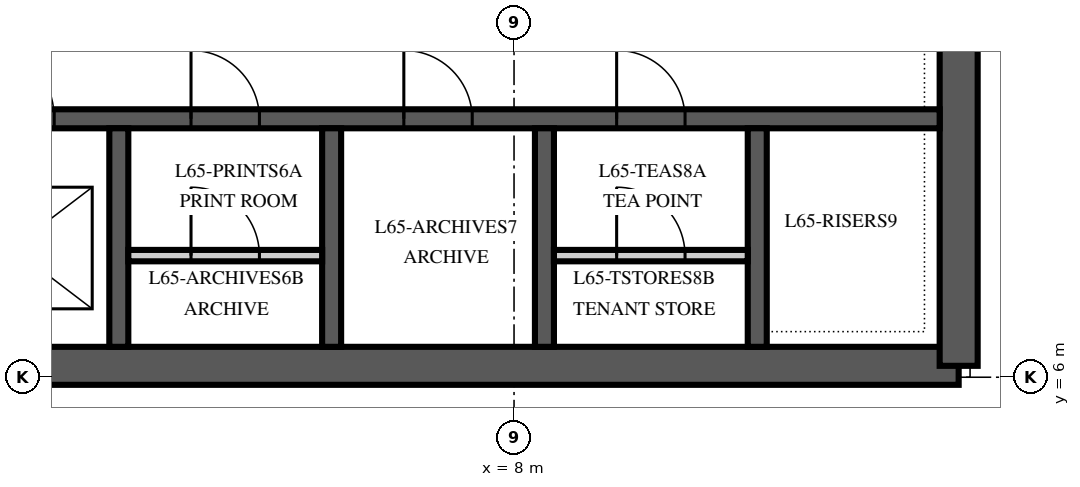
"""IFC4 building model, lengths in metres.
Left out: names, types, materials, properties, quantities, classifications, styles, units other than length and angle.
Written with IfcOpenShell. Run it as: python <this file> out.ifc"""

import sys

from ifc_helpers import new_model, si_unit, direction, frame, frame_2d, origin, place, context, subcontext, project, spatial, polyline, rectangle, outline, extrude, element, fill, save


model = new_model("IFC4")
c1 = context("Model", 3, precision=1e-05, world=origin(), true_north=direction((0.0, 1.0)))
c2 = subcontext(c1, "Body", "Model", "MODEL_VIEW")
j1 = project(units=[si_unit("LENGTHUNIT", "METRE"), si_unit("PLANEANGLEUNIT", "RADIAN")], contexts=[c1])
p1 = place(None, origin())
s1 = spatial("IfcSite", under=j1, at=p1, CompositionType="ELEMENT")
p2 = place(p1, origin())
s2 = spatial("IfcBuilding", under=s1, at=p2, CompositionType="ELEMENT")
p3 = place(p2, frame((0.0, 0.0, 280.0)))
s3 = spatial("IfcBuildingStorey", under=s2, at=p3, CompositionType="ELEMENT", Elevation=280.0)
p4 = place(p3, frame((-13.85, 6.15, 0.0), z_axis=(0.0, 0.0, 1.0), x_axis=(1.0, 0.0, 0.0)))
e1 = element("IfcWall", 1, at=p4, inside=s3, PredefinedType="SHEAR", context=c2, shape_type="SweptSolid", body=[
    extrude(rectangle(XDim=27.7, YDim=0.5, at=frame_2d((13.85, 0.0))), origin(), (0.0, 0.0, 1.0), 4.0),
])
p5 = place(p3, frame((13.85, 6.15, 0.0), z_axis=(0.0, 0.0, 1.0), x_axis=(0.0, 1.0, 0.0)))
e2 = element("IfcWall", 2, at=p5, inside=s3, PredefinedType="SHEAR", context=c2, shape_type="SweptSolid", body=[
    extrude(outline(polyline([(0.0, -0.25), (17.7, -0.25), (17.7, 0.0), (17.45, 0.0), (17.45, 0.25), (0.25, 0.25), (0.25, 0.0), (0.0, 0.0), (0.0, -0.25)])), origin(), (0.0, 0.0, 1.0), 4.0),
])
p6 = place(p5, frame((4.15, 0.0, 0.0)))
e3 = element("IfcOpeningElement", 3, at=p6, cuts=e2, PredefinedType="OPENING", context=c2, shape_type="SweptSolid", body=[
    extrude(rectangle(XDim=1.8, YDim=2.4, at=frame_2d((0.9, 1.2))), frame((0.0, 0.265, 0.0), z_axis=(0.0, -1.0, 0.0), x_axis=(1.0, 0.0, 0.0)), (0.0, 0.0, 1.0), 0.53),
])
p7 = place(p3, frame((-13.6, 9.4, 0.0), z_axis=(0.0, 0.0, 1.0), x_axis=(1.0, 0.0, 0.0)))
e4 = element("IfcWall", 4, at=p7, inside=s3, PredefinedType="SHEAR", context=c2, shape_type="SweptSolid", body=[
    extrude(rectangle(XDim=27.2, YDim=0.25, at=frame_2d((13.6, 0.0))), origin(), (0.0, 0.0, 1.0), 4.0),
])
p8 = place(p7, frame((8.85, 0.0, 0.0)))
e5 = element("IfcOpeningElement", 5, at=p8, cuts=e4, PredefinedType="OPENING", context=c2, shape_type="SweptSolid", body=[
    extrude(rectangle(XDim=1.1, YDim=2.1, at=frame_2d((0.55, 1.05))), frame((0.0, 0.14, 0.0), z_axis=(0.0, -1.0, 0.0), x_axis=(1.0, 0.0, 0.0)), (0.0, 0.0, 1.0), 0.28),
])
p9 = place(p7, frame((11.65, 0.0, 0.0)))
e6 = element("IfcOpeningElement", 6, at=p9, cuts=e4, PredefinedType="OPENING", context=c2, shape_type="SweptSolid", body=[
    extrude(rectangle(XDim=1.1, YDim=2.1, at=frame_2d((0.55, 1.05))), frame((0.0, 0.14, 0.0), z_axis=(0.0, -1.0, 0.0), x_axis=(1.0, 0.0, 0.0)), (0.0, 0.0, 1.0), 0.28),
])
p10 = place(p7, frame((14.45, 0.0, 0.0)))
e7 = element("IfcOpeningElement", 7, at=p10, cuts=e4, PredefinedType="OPENING", context=c2, shape_type="SweptSolid", body=[
    extrude(rectangle(XDim=1.1, YDim=2.1, at=frame_2d((0.55, 1.05))), frame((0.0, 0.14, 0.0), z_axis=(0.0, -1.0, 0.0), x_axis=(1.0, 0.0, 0.0)), (0.0, 0.0, 1.0), 0.28),
])
p11 = place(p7, frame((0.55, 0.0, 0.0)))
e8 = element("IfcOpeningElement", 8, at=p11, cuts=e4, PredefinedType="OPENING", context=c2, shape_type="SweptSolid", body=[
    extrude(rectangle(XDim=0.9, YDim=2.1, at=frame_2d((0.45, 1.05))), frame((0.0, 0.14, 0.0), z_axis=(0.0, -1.0, 0.0), x_axis=(1.0, 0.0, 0.0)), (0.0, 0.0, 1.0), 0.28),
])
p12 = place(p7, frame((3.35, 0.0, 0.0)))
e9 = element("IfcOpeningElement", 9, at=p12, cuts=e4, PredefinedType="OPENING", context=c2, shape_type="SweptSolid", body=[
    extrude(rectangle(XDim=0.9, YDim=2.1, at=frame_2d((0.45, 1.05))), frame((0.0, 0.14, 0.0), z_axis=(0.0, -1.0, 0.0), x_axis=(1.0, 0.0, 0.0)), (0.0, 0.0, 1.0), 0.28),
])
p13 = place(p7, frame((6.15, 0.0, 0.0)))
e10 = element("IfcOpeningElement", 10, at=p13, cuts=e4, PredefinedType="OPENING", context=c2, shape_type="SweptSolid", body=[
    extrude(rectangle(XDim=0.9, YDim=2.1, at=frame_2d((0.45, 1.05))), frame((0.0, 0.14, 0.0), z_axis=(0.0, -1.0, 0.0), x_axis=(1.0, 0.0, 0.0)), (0.0, 0.0, 1.0), 0.28),
])
p14 = place(p7, frame((17.35, 0.0, 0.0)))
e11 = element("IfcOpeningElement", 11, at=p14, cuts=e4, PredefinedType="OPENING", context=c2, shape_type="SweptSolid", body=[
    extrude(rectangle(XDim=0.9, YDim=2.1, at=frame_2d((0.45, 1.05))), frame((0.0, 0.14, 0.0), z_axis=(0.0, -1.0, 0.0), x_axis=(1.0, 0.0, 0.0)), (0.0, 0.0, 1.0), 0.28),
])
p15 = place(p7, frame((20.15, 0.0, 0.0)))
e12 = element("IfcOpeningElement", 12, at=p15, cuts=e4, PredefinedType="OPENING", context=c2, shape_type="SweptSolid", body=[
    extrude(rectangle(XDim=0.9, YDim=2.1, at=frame_2d((0.45, 1.05))), frame((0.0, 0.14, 0.0), z_axis=(0.0, -1.0, 0.0), x_axis=(1.0, 0.0, 0.0)), (0.0, 0.0, 1.0), 0.28),
])
p16 = place(p7, frame((22.95, 0.0, 0.0)))
e13 = element("IfcOpeningElement", 13, at=p16, cuts=e4, PredefinedType="OPENING", context=c2, shape_type="SweptSolid", body=[
    extrude(rectangle(XDim=0.9, YDim=2.1, at=frame_2d((0.45, 1.05))), frame((0.0, 0.14, 0.0), z_axis=(0.0, -1.0, 0.0), x_axis=(1.0, 0.0, 0.0)), (0.0, 0.0, 1.0), 0.28),
])
for number, where, z_axis, x_axis in (
    (14, (2.8, 6.4, 0.0), (0.0, 0.0, 1.0), (0.0, 1.0, 0.0)),
    (15, (5.6, 6.4, 0.0), (0.0, 0.0, 1.0), (0.0, 1.0, 0.0)),
    (16, (8.4, 6.4, 0.0), (0.0, 0.0, 1.0), (0.0, 1.0, 0.0)),
    (17, (11.2, 6.4, 0.0), (0.0, 0.0, 1.0), (0.0, 1.0, 0.0)),
):
    element("IfcWall", number, at=place(p3, frame(where, z_axis=z_axis, x_axis=x_axis)), inside=s3, PredefinedType="SHEAR", context=c2, shape_type="SweptSolid", body=[
        extrude(rectangle(XDim=2.875, YDim=0.25, at=frame_2d((1.438, 0.0))), origin(), (0.0, 0.0, 1.0), 4.0),
    ])
p17 = place(p3, frame((2.925, 7.6, 0.0), z_axis=(0.0, 0.0, 1.0), x_axis=(1.0, 0.0, 0.0)))
e18 = element("IfcWall", 18, at=p17, inside=s3, PredefinedType="PARTITIONING", context=c2, shape_type="SweptSolid", body=[
    extrude(rectangle(XDim=2.55, YDim=0.15, at=frame_2d((1.275, 0.0))), origin(), (0.0, 0.0, 1.0), 3.85),
])
p18 = place(p17, frame((0.825, 0.0, 0.0)))
e19 = element("IfcOpeningElement", 19, at=p18, cuts=e18, PredefinedType="OPENING", context=c2, shape_type="SweptSolid", body=[
    extrude(rectangle(XDim=0.9, YDim=2.1, at=frame_2d((0.45, 1.05))), frame((0.0, 0.09, 0.0), z_axis=(0.0, -1.0, 0.0), x_axis=(1.0, 0.0, 0.0)), (0.0, 0.0, 1.0), 0.18),
])
p19 = place(p3, frame((8.525, 7.6, 0.0), z_axis=(0.0, 0.0, 1.0), x_axis=(1.0, 0.0, 0.0)))
e20 = element("IfcWall", 20, at=p19, inside=s3, PredefinedType="PARTITIONING", context=c2, shape_type="SweptSolid", body=[
    extrude(rectangle(XDim=2.55, YDim=0.15, at=frame_2d((1.275, 0.0))), origin(), (0.0, 0.0, 1.0), 3.85),
])
p20 = place(p19, frame((0.825, 0.0, 0.0)))
e21 = element("IfcOpeningElement", 21, at=p20, cuts=e20, PredefinedType="OPENING", context=c2, shape_type="SweptSolid", body=[
    extrude(rectangle(XDim=0.9, YDim=2.1, at=frame_2d((0.45, 1.05))), frame((0.0, 0.09, 0.0), z_axis=(0.0, -1.0, 0.0), x_axis=(1.0, 0.0, 0.0)), (0.0, 0.0, 1.0), 0.18),
])
p21 = place(p10, origin())
e22 = element("IfcDoor", 22, at=p21, inside=s3, OperationType="SLIDING_TO_LEFT", PredefinedType="DOOR", context=c2, shape_type="SweptSolid", body=[
    extrude(rectangle(XDim=1.1, YDim=2.1, at=frame_2d((0.55, 1.05))), frame((0.0, 0.125, 0.0), z_axis=(0.0, -1.0, 0.0), x_axis=(1.0, 0.0, 0.0)), (0.0, 0.0, 1.0), 0.25),
])
fill(e7, e22)
p22 = place(p14, origin())
e23 = element("IfcDoor", 23, at=p22, inside=s3, OperationType="SINGLE_SWING_LEFT", PredefinedType="DOOR", context=c2, shape_type="SweptSolid", body=[
    extrude(rectangle(XDim=0.9, YDim=2.1, at=frame_2d((0.45, 1.05))), frame((0.0, 0.125, 0.0), z_axis=(0.0, -1.0, 0.0), x_axis=(1.0, 0.0, 0.0)), (0.0, 0.0, 1.0), 0.25),
])
fill(e11, e23)
p23 = place(p18, origin())
e24 = element("IfcDoor", 24, at=p23, inside=s3, OperationType="SINGLE_SWING_LEFT", PredefinedType="DOOR", context=c2, shape_type="SweptSolid", body=[
    extrude(rectangle(XDim=0.9, YDim=2.1, at=frame_2d((0.45, 1.05))), frame((0.0, 0.075, 0.0), z_axis=(0.0, -1.0, 0.0), x_axis=(1.0, 0.0, 0.0)), (0.0, 0.0, 1.0), 0.149),
])
fill(e19, e24)
p24 = place(p15, origin())
e25 = element("IfcDoor", 25, at=p24, inside=s3, OperationType="SINGLE_SWING_LEFT", PredefinedType="DOOR", context=c2, shape_type="SweptSolid", body=[
    extrude(rectangle(XDim=0.9, YDim=2.1, at=frame_2d((0.45, 1.05))), frame((0.0, 0.125, 0.0), z_axis=(0.0, -1.0, 0.0), x_axis=(1.0, 0.0, 0.0)), (0.0, 0.0, 1.0), 0.25),
])
fill(e12, e25)
p25 = place(p16, origin())
e26 = element("IfcDoor", 26, at=p25, inside=s3, OperationType="SINGLE_SWING_LEFT", PredefinedType="DOOR", context=c2, shape_type="SweptSolid", body=[
    extrude(rectangle(XDim=0.9, YDim=2.1, at=frame_2d((0.45, 1.05))), frame((0.0, 0.125, 0.0), z_axis=(0.0, -1.0, 0.0), x_axis=(1.0, 0.0, 0.0)), (0.0, 0.0, 1.0), 0.25),
])
fill(e13, e26)
p26 = place(p20, origin())
e27 = element("IfcDoor", 27, at=p26, inside=s3, OperationType="SINGLE_SWING_LEFT", PredefinedType="DOOR", context=c2, shape_type="SweptSolid", body=[
    extrude(rectangle(XDim=0.9, YDim=2.1, at=frame_2d((0.45, 1.05))), frame((0.0, 0.075, 0.0), z_axis=(0.0, -1.0, 0.0), x_axis=(1.0, 0.0, 0.0)), (0.0, 0.0, 1.0), 0.149),
])
fill(e21, e27)
save(model, sys.argv[1])
